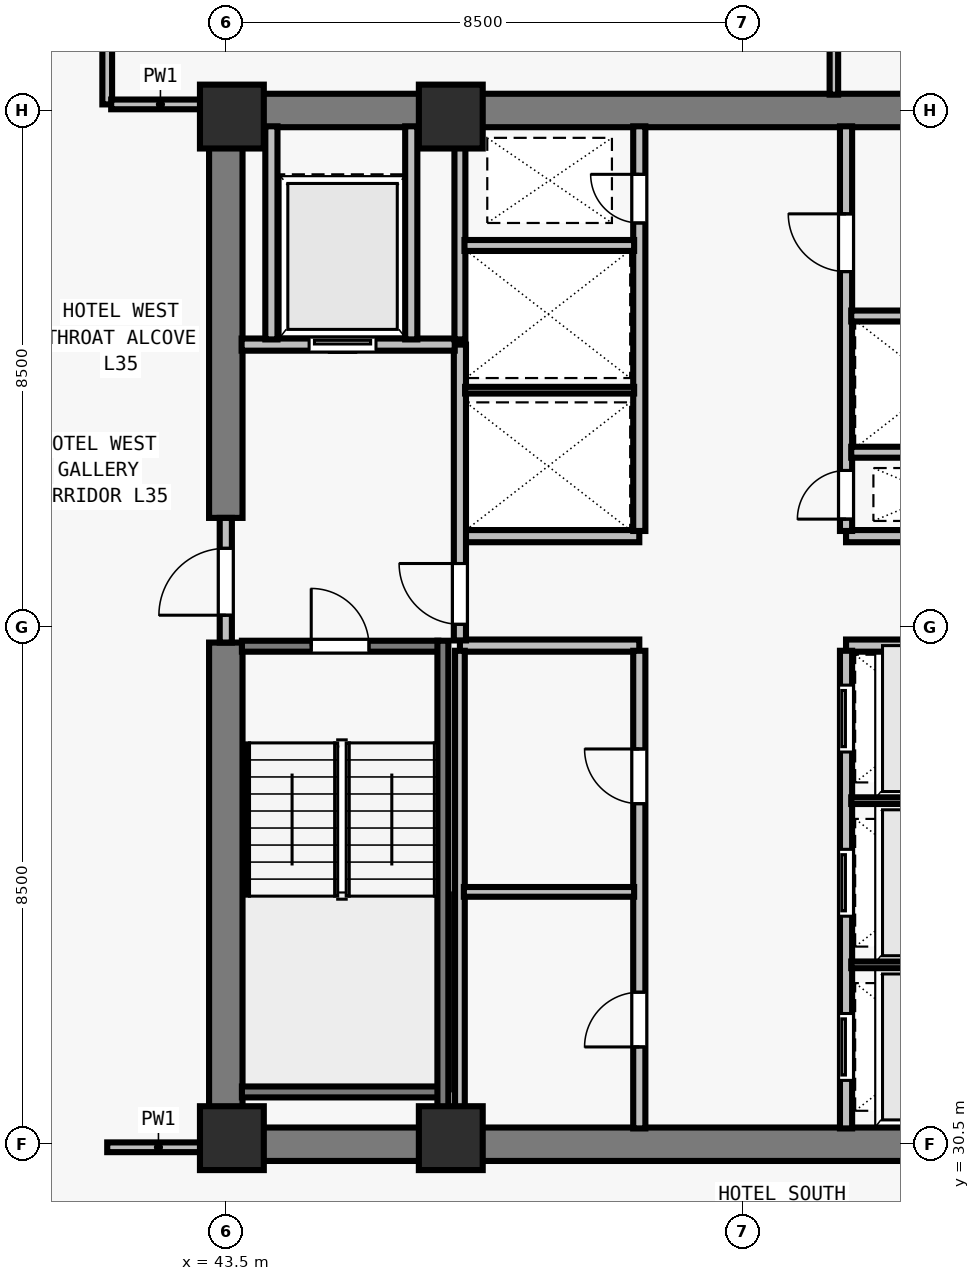
"""IFC4 building model, lengths in metres.
Left out: names, types, materials, properties, quantities, classifications, styles, units other than length and angle.
Written with IfcOpenShell. Run it as: python <this file> out.ifc"""

import sys

from ifc_helpers import new_model, si_unit, direction, frame, frame_2d, origin, origin_2d, place, context, subcontext, project, spatial, rectangle, extrude, element, fill, save


model = new_model("IFC4")
c1 = context("Model", 3, precision=1e-05, world=origin(), true_north=direction((0.0, 1.0)))
c2 = subcontext(c1, "Body", "Model", "MODEL_VIEW")
j1 = project(units=[si_unit("LENGTHUNIT", "METRE"), si_unit("PLANEANGLEUNIT", "RADIAN")], contexts=[c1])
p1 = place(None, origin())
s1 = spatial("IfcSite", under=j1, at=p1, CompositionType="ELEMENT")
p2 = place(p1, origin())
s2 = spatial("IfcBuilding", under=s1, at=p2, CompositionType="ELEMENT")
p3 = place(p2, frame((0.0, 0.0, 130.5)))
s3 = spatial("IfcBuildingStorey", under=s2, at=p3, CompositionType="ELEMENT", Elevation=130.5)
for number, where, z_axis, x_axis in (
    (1, (43.6, 30.6, 0.0), (0.0, 0.0, 1.0), (1.0, 0.0, 0.0)),
    (2, (47.2, 30.6, 0.0), (0.0, 0.0, 1.0), (1.0, 0.0, 0.0)),
    (3, (43.6, 47.4, 0.0), (0.0, 0.0, 1.0), (1.0, 0.0, 0.0)),
    (4, (47.2, 47.4, 0.0), (0.0, 0.0, 1.0), (1.0, 0.0, 0.0)),
):
    element("IfcColumn", number, at=place(p3, frame(where, z_axis=z_axis, x_axis=x_axis)), inside=s3, PredefinedType="COLUMN", context=c2, shape_type="SweptSolid", body=[
        extrude(rectangle(XDim=1.05, YDim=1.05, at=origin_2d()), origin(), (0.0, 0.0, 1.0), 3.5),
    ])
for number, where, z_axis, x_axis in (
    (5, (43.225, 30.5, 0.0), (0.0, 0.0, 1.0), (1.0, 0.0, 0.0)),
    (6, (43.225, 47.5, 0.0), (0.0, 0.0, 1.0), (1.0, 0.0, 0.0)),
):
    element("IfcWall", number, at=place(p3, frame(where, z_axis=z_axis, x_axis=x_axis)), inside=s3, PredefinedType="SHEAR", context=c2, shape_type="SweptSolid", body=[
        extrude(rectangle(XDim=17.55, YDim=0.55, at=frame_2d((8.775, 0.0))), origin(), (0.0, 0.0, 1.0), 3.28),
    ])
p4 = place(p3, frame((43.5, 30.765, 0.0), z_axis=(0.0, 0.0, 1.0), x_axis=(0.0, 1.0, 0.0)))
e7 = element("IfcWall", 7, at=p4, inside=s3, PredefinedType="SHEAR", context=c2, shape_type="SweptSolid", body=[
    extrude(rectangle(XDim=7.985, YDim=0.55, at=frame_2d((3.993, 0.0))), origin(), (0.0, 0.0, 1.0), 3.28),
])
p5 = place(p3, frame((43.5, 40.8, 0.0), z_axis=(0.0, 0.0, 1.0), x_axis=(0.0, 1.0, 0.0)))
e8 = element("IfcWall", 8, at=p5, inside=s3, PredefinedType="SHEAR", context=c2, shape_type="SweptSolid", body=[
    extrude(rectangle(XDim=6.435, YDim=0.55, at=frame_2d((3.218, 0.0))), origin(), (0.0, 0.0, 1.0), 3.28),
])
for number, where, z_axis, x_axis in (
    (9, (47.35, 38.7, 0.0), (0.0, 0.0, 1.0), (1.0, 0.0, 0.0)),
    (10, (47.35, 40.5, 0.0), (0.0, 0.0, 1.0), (1.0, 0.0, 0.0)),
    (11, (53.7, 38.7, 0.0), (0.0, 0.0, 1.0), (1.0, 0.0, 0.0)),
    (12, (53.7, 40.5, 0.0), (0.0, 0.0, 1.0), (1.0, 0.0, 0.0)),
):
    element("IfcWall", number, at=place(p3, frame(where, z_axis=z_axis, x_axis=x_axis)), inside=s3, PredefinedType="SOLIDWALL", context=c2, shape_type="SweptSolid", body=[
        extrude(rectangle(XDim=2.95, YDim=0.2, at=frame_2d((1.475, 0.0))), origin(), (0.0, 0.0, 1.0), 3.28),
    ])
p6 = place(p3, frame((50.3, 30.76, 0.0), z_axis=(0.0, 0.0, 1.0), x_axis=(0.0, 1.0, 0.0)))
e13 = element("IfcWall", 13, at=p6, inside=s3, PredefinedType="SOLIDWALL", context=c2, shape_type="SweptSolid", body=[
    extrude(rectangle(XDim=7.855, YDim=0.2, at=frame_2d((3.927, 0.0))), origin(), (0.0, 0.0, 1.0), 3.28),
])
p7 = place(p6, frame((1.34, 0.0, 0.0)))
e14 = element("IfcOpeningElement", 14, at=p7, cuts=e13, PredefinedType="OPENING", context=c2, shape_type="SweptSolid", body=[
    extrude(rectangle(XDim=0.9, YDim=2.12, at=frame_2d((0.45, 1.06))), frame((0.0, 0.11, 0.0), z_axis=(0.0, -1.0, 0.0), x_axis=(1.0, 0.0, 0.0)), (0.0, 0.0, 1.0), 0.22),
])
p8 = place(p6, frame((5.34, 0.0, 0.0)))
e15 = element("IfcOpeningElement", 15, at=p8, cuts=e13, PredefinedType="OPENING", context=c2, shape_type="SweptSolid", body=[
    extrude(rectangle(XDim=0.9, YDim=2.12, at=frame_2d((0.45, 1.06))), frame((0.0, 0.11, 0.0), z_axis=(0.0, -1.0, 0.0), x_axis=(1.0, 0.0, 0.0)), (0.0, 0.0, 1.0), 0.22),
])
p9 = place(p3, frame((53.7, 30.76, 0.0), z_axis=(0.0, 0.0, 1.0), x_axis=(0.0, 1.0, 0.0)))
e16 = element("IfcWall", 16, at=p9, inside=s3, PredefinedType="SOLIDWALL", context=c2, shape_type="SweptSolid", body=[
    extrude(rectangle(XDim=7.855, YDim=0.2, at=frame_2d((3.927, 0.0))), origin(), (0.0, 0.0, 1.0), 3.28),
])
p10 = place(p9, frame((0.79, 0.0, 0.0)))
e17 = element("IfcOpeningElement", 17, at=p10, cuts=e16, PredefinedType="OPENING", context=c2, shape_type="SweptSolid", body=[
    extrude(rectangle(XDim=1.1, YDim=2.2, at=frame_2d((0.55, 1.1))), frame((0.0, 0.11, 0.0), z_axis=(0.0, -1.0, 0.0), x_axis=(1.0, 0.0, 0.0)), (0.0, 0.0, 1.0), 0.22),
])
p11 = place(p9, frame((3.49, 0.0, 0.0)))
e18 = element("IfcOpeningElement", 18, at=p11, cuts=e16, PredefinedType="OPENING", context=c2, shape_type="SweptSolid", body=[
    extrude(rectangle(XDim=1.1, YDim=2.2, at=frame_2d((0.55, 1.1))), frame((0.0, 0.11, 0.0), z_axis=(0.0, -1.0, 0.0), x_axis=(1.0, 0.0, 0.0)), (0.0, 0.0, 1.0), 0.22),
])
p12 = place(p9, frame((6.19, 0.0, 0.0)))
e19 = element("IfcOpeningElement", 19, at=p12, cuts=e16, PredefinedType="OPENING", context=c2, shape_type="SweptSolid", body=[
    extrude(rectangle(XDim=1.1, YDim=2.2, at=frame_2d((0.55, 1.1))), frame((0.0, 0.11, 0.0), z_axis=(0.0, -1.0, 0.0), x_axis=(1.0, 0.0, 0.0)), (0.0, 0.0, 1.0), 0.22),
])
p13 = place(p3, frame((50.3, 40.585, 0.0), z_axis=(0.0, 0.0, 1.0), x_axis=(0.0, 1.0, 0.0)))
e20 = element("IfcWall", 20, at=p13, inside=s3, PredefinedType="SOLIDWALL", context=c2, shape_type="SweptSolid", body=[
    extrude(rectangle(XDim=6.655, YDim=0.2, at=frame_2d((3.328, 0.0))), origin(), (0.0, 0.0, 1.0), 3.28),
])
p14 = place(p13, frame((5.065, 0.0, 0.0)))
e21 = element("IfcOpeningElement", 21, at=p14, cuts=e20, PredefinedType="OPENING", context=c2, shape_type="SweptSolid", body=[
    extrude(rectangle(XDim=0.8, YDim=2.08, at=frame_2d((0.4, 1.04))), frame((0.0, 0.11, 0.0), z_axis=(0.0, -1.0, 0.0), x_axis=(1.0, 0.0, 0.0)), (0.0, 0.0, 1.0), 0.22),
])
p15 = place(p3, frame((53.7, 40.585, 0.0), z_axis=(0.0, 0.0, 1.0), x_axis=(0.0, 1.0, 0.0)))
e22 = element("IfcWall", 22, at=p15, inside=s3, PredefinedType="SOLIDWALL", context=c2, shape_type="SweptSolid", body=[
    extrude(rectangle(XDim=6.655, YDim=0.2, at=frame_2d((3.328, 0.0))), origin(), (0.0, 0.0, 1.0), 3.28),
])
p16 = place(p15, frame((0.195, 0.0, 0.0)))
e23 = element("IfcOpeningElement", 23, at=p16, cuts=e22, PredefinedType="OPENING", context=c2, shape_type="SweptSolid", body=[
    extrude(rectangle(XDim=0.8, YDim=2.08, at=frame_2d((0.4, 1.04))), frame((0.0, 0.11, 0.0), z_axis=(0.0, -1.0, 0.0), x_axis=(1.0, 0.0, 0.0)), (0.0, 0.0, 1.0), 0.22),
])
p17 = place(p15, frame((4.265, 0.0, 0.0)))
e24 = element("IfcOpeningElement", 24, at=p17, cuts=e22, PredefinedType="OPENING", context=c2, shape_type="SweptSolid", body=[
    extrude(rectangle(XDim=0.95, YDim=2.12, at=frame_2d((0.475, 1.06))), frame((0.0, 0.11, 0.0), z_axis=(0.0, -1.0, 0.0), x_axis=(1.0, 0.0, 0.0)), (0.0, 0.0, 1.0), 0.22),
])
p18 = place(p3, frame((43.5, 38.75, 0.0), z_axis=(0.0, 0.0, 1.0), x_axis=(0.0, 1.0, 0.0)))
e25 = element("IfcWall", 25, at=p18, inside=s3, PredefinedType="SOLIDWALL", context=c2, shape_type="SweptSolid", body=[
    extrude(rectangle(XDim=2.05, YDim=0.2, at=frame_2d((1.025, 0.0))), origin(), (0.0, 0.0, 1.0), 3.28),
])
p19 = place(p18, frame((0.45, 0.0, 0.0)))
e26 = element("IfcOpeningElement", 26, at=p19, cuts=e25, PredefinedType="OPENING", context=c2, shape_type="SweptSolid", body=[
    extrude(rectangle(XDim=1.1, YDim=2.15, at=frame_2d((0.55, 1.075))), frame((0.0, 0.11, 0.0), z_axis=(0.0, -1.0, 0.0), x_axis=(1.0, 0.0, 0.0)), (0.0, 0.0, 1.0), 0.22),
])
p20 = place(p3, frame((47.35, 38.785, 0.0), z_axis=(0.0, 0.0, 1.0), x_axis=(0.0, 1.0, 0.0)))
e27 = element("IfcWall", 27, at=p20, inside=s3, PredefinedType="SOLIDWALL", context=c2, shape_type="SweptSolid", body=[
    extrude(rectangle(XDim=4.865, YDim=0.2, at=frame_2d((2.433, 0.0))), origin(), (0.0, 0.0, 1.0), 3.28),
])
p21 = place(p20, frame((0.265, 0.0, 0.0)))
e28 = element("IfcOpeningElement", 28, at=p21, cuts=e27, PredefinedType="OPENING", context=c2, shape_type="SweptSolid", body=[
    extrude(rectangle(XDim=1.0, YDim=2.15, at=frame_2d((0.5, 1.075))), frame((0.0, 0.11, 0.0), z_axis=(0.0, -1.0, 0.0), x_axis=(1.0, 0.0, 0.0)), (0.0, 0.0, 1.0), 0.22),
])
p22 = place(p3, frame((43.76, 43.65, 0.0), z_axis=(0.0, 0.0, 1.0), x_axis=(1.0, 0.0, 0.0)))
e29 = element("IfcWall", 29, at=p22, inside=s3, PredefinedType="SOLIDWALL", context=c2, shape_type="SweptSolid", body=[
    extrude(rectangle(XDim=3.505, YDim=0.2, at=frame_2d((1.752, 0.0))), origin(), (0.0, 0.0, 1.0), 3.28),
])
p23 = place(p22, frame((1.11, 0.0, 0.0)))
e30 = element("IfcOpeningElement", 30, at=p23, cuts=e29, PredefinedType="OPENING", context=c2, shape_type="SweptSolid", body=[
    extrude(rectangle(XDim=1.1, YDim=2.2, at=frame_2d((0.55, 1.1))), frame((0.0, 0.11, 0.0), z_axis=(0.0, -1.0, 0.0), x_axis=(1.0, 0.0, 0.0)), (0.0, 0.0, 1.0), 0.22),
])
for number, where, z_axis, x_axis in (
    (31, (46.55, 43.735, 0.0), (0.0, 0.0, 1.0), (0.0, 1.0, 0.0)),
    (32, (44.25, 43.735, 0.0), (0.0, 0.0, 1.0), (0.0, 1.0, 0.0)),
):
    element("IfcWall", number, at=place(p3, frame(where, z_axis=z_axis, x_axis=x_axis)), inside=s3, PredefinedType="SOLIDWALL", context=c2, shape_type="SweptSolid", body=[
        extrude(rectangle(XDim=3.505, YDim=0.2, at=frame_2d((1.752, 0.0))), origin(), (0.0, 0.0, 1.0), 3.28),
    ])
p24 = place(p3, frame((47.35, 30.76, 0.0), z_axis=(0.0, 0.0, 1.0), x_axis=(0.0, 1.0, 0.0)))
e33 = element("IfcWall", 33, at=p24, inside=s3, PredefinedType="PARTITIONING", context=c2, shape_type="SweptSolid", body=[
    extrude(rectangle(XDim=7.855, YDim=0.16, at=frame_2d((3.927, 0.0))), origin(), (0.0, 0.0, 1.0), 3.28),
])
p25 = place(p3, frame((47.415, 34.65, 0.0), z_axis=(0.0, 0.0, 1.0), x_axis=(1.0, 0.0, 0.0)))
e34 = element("IfcWall", 34, at=p25, inside=s3, PredefinedType="PARTITIONING", context=c2, shape_type="SweptSolid", body=[
    extrude(rectangle(XDim=2.8, YDim=0.16, at=frame_2d((1.4, 0.0))), origin(), (0.0, 0.0, 1.0), 3.28),
])
for number, where, z_axis, x_axis in (
    (35, (53.785, 33.45, 0.0), (0.0, 0.0, 1.0), (1.0, 0.0, 0.0)),
    (36, (53.785, 36.15, 0.0), (0.0, 0.0, 1.0), (1.0, 0.0, 0.0)),
):
    element("IfcWall", number, at=place(p3, frame(where, z_axis=z_axis, x_axis=x_axis)), inside=s3, PredefinedType="PARTITIONING", context=c2, shape_type="SweptSolid", body=[
        extrude(rectangle(XDim=2.79, YDim=0.11, at=frame_2d((1.395, 0.0))), origin(), (0.0, 0.0, 1.0), 3.28),
    ])
p26 = place(p3, frame((47.35, 43.735, 0.0), z_axis=(0.0, 0.0, 1.0), x_axis=(0.0, 1.0, 0.0)))
e37 = element("IfcWall", 37, at=p26, inside=s3, PredefinedType="SOLIDWALL", context=c2, shape_type="SweptSolid", body=[
    extrude(rectangle(XDim=3.505, YDim=0.18, at=frame_2d((1.752, 0.0))), origin(), (0.0, 0.0, 1.0), 3.28),
])
p27 = place(p3, frame((47.435, 42.9, 0.0), z_axis=(0.0, 0.0, 1.0), x_axis=(1.0, 0.0, 0.0)))
e38 = element("IfcWall", 38, at=p27, inside=s3, PredefinedType="PARTITIONING", context=c2, shape_type="SweptSolid", body=[
    extrude(rectangle(XDim=2.78, YDim=0.11, at=frame_2d((1.39, 0.0))), origin(), (0.0, 0.0, 1.0), 3.28),
])
p28 = place(p3, frame((47.425, 45.28, 0.0), z_axis=(0.0, 0.0, 1.0), x_axis=(1.0, 0.0, 0.0)))
e39 = element("IfcWall", 39, at=p28, inside=s3, PredefinedType="SOLIDWALL", context=c2, shape_type="SweptSolid", body=[
    extrude(rectangle(XDim=2.79, YDim=0.18, at=frame_2d((1.395, 0.0))), origin(), (0.0, 0.0, 1.0), 3.28),
])
p29 = place(p3, frame((53.785, 41.88, 0.0), z_axis=(0.0, 0.0, 1.0), x_axis=(1.0, 0.0, 0.0)))
e40 = element("IfcWall", 40, at=p29, inside=s3, PredefinedType="SOLIDWALL", context=c2, shape_type="SweptSolid", body=[
    extrude(rectangle(XDim=2.78, YDim=0.18, at=frame_2d((1.39, 0.0))), origin(), (0.0, 0.0, 1.0), 3.28),
])
p30 = place(p3, frame((53.785, 44.12, 0.0), z_axis=(0.0, 0.0, 1.0), x_axis=(1.0, 0.0, 0.0)))
e41 = element("IfcWall", 41, at=p30, inside=s3, PredefinedType="SOLIDWALL", context=c2, shape_type="SweptSolid", body=[
    extrude(rectangle(XDim=2.79, YDim=0.18, at=frame_2d((1.395, 0.0))), origin(), (0.0, 0.0, 1.0), 3.28),
])
p31 = place(p3, frame((41.55, 47.6, 0.0), z_axis=(0.0, 0.0, 1.0), x_axis=(0.0, 1.0, 0.0)))
e42 = element("IfcWall", 42, at=p31, inside=s3, PredefinedType="PARTITIONING", context=c2, shape_type="SweptSolid", body=[
    extrude(rectangle(XDim=15.075, YDim=0.16, at=frame_2d((7.538, 0.0))), origin(), (0.0, 0.0, 1.0), 2.555),
])
p32 = place(p31, frame((3.5, 0.0, 0.0)))
e43 = element("IfcOpeningElement", 43, at=p32, cuts=e42, PredefinedType="OPENING", context=c2, shape_type="SweptSolid", body=[
    extrude(rectangle(XDim=0.96, YDim=2.12, at=frame_2d((0.48, 1.06))), frame((0.0, 0.09, 0.0), z_axis=(0.0, -1.0, 0.0), x_axis=(1.0, 0.0, 0.0)), (0.0, 0.0, 1.0), 0.18),
])
p33 = place(p3, frame((41.55, 30.45, 0.0), z_axis=(0.0, 0.0, 1.0), x_axis=(1.0, 0.0, 0.0)))
e44 = element("IfcWall", 44, at=p33, inside=s3, PredefinedType="PARTITIONING", context=c2, shape_type="SweptSolid", body=[
    extrude(rectangle(XDim=1.685, YDim=0.16, at=frame_2d((0.843, 0.0))), origin(), (0.0, 0.0, 1.0), 3.28),
])
p34 = place(p3, frame((41.615, 47.6, 0.0), z_axis=(0.0, 0.0, 1.0), x_axis=(1.0, 0.0, 0.0)))
e45 = element("IfcWall", 45, at=p34, inside=s3, PredefinedType="PARTITIONING", context=c2, shape_type="SweptSolid", body=[
    extrude(rectangle(XDim=1.62, YDim=0.16, at=frame_2d((0.81, 0.0))), origin(), (0.0, 0.0, 1.0), 3.28),
])
p35 = place(p3, frame((53.5, 47.76, 0.0), z_axis=(0.0, 0.0, 1.0), x_axis=(0.0, 1.0, 0.0)))
e46 = element("IfcWall", 46, at=p35, inside=s3, PredefinedType="PARTITIONING", context=c2, shape_type="SweptSolid", body=[
    extrude(rectangle(XDim=14.915, YDim=0.14, at=frame_2d((7.458, 0.0))), origin(), (0.0, 0.0, 1.0), 2.896),
])
p36 = place(p3, frame((43.765, 38.69, 0.0), z_axis=(0.0, 0.0, 1.0), x_axis=(1.0, 0.0, 0.0)))
e47 = element("IfcWall", 47, at=p36, inside=s3, PredefinedType="SOLIDWALL", context=c2, shape_type="SweptSolid", body=[
    extrude(rectangle(XDim=3.23, YDim=0.18, at=frame_2d((1.615, 0.0))), origin(), (0.0, 0.0, 1.0), 3.28),
])
p37 = place(p36, frame((1.14, 0.0, 0.0)))
e48 = element("IfcOpeningElement", 48, at=p37, cuts=e47, PredefinedType="OPENING", context=c2, shape_type="SweptSolid", body=[
    extrude(rectangle(XDim=0.95, YDim=2.15, at=frame_2d((0.475, 1.075))), frame((0.0, 0.1, 0.0), z_axis=(0.0, -1.0, 0.0), x_axis=(1.0, 0.0, 0.0)), (0.0, 0.0, 1.0), 0.2),
])
p38 = place(p3, frame((43.765, 31.36, 0.0), z_axis=(0.0, 0.0, 1.0), x_axis=(1.0, 0.0, 0.0)))
e49 = element("IfcWall", 49, at=p38, inside=s3, PredefinedType="SOLIDWALL", context=c2, shape_type="SweptSolid", body=[
    extrude(rectangle(XDim=3.23, YDim=0.18, at=frame_2d((1.615, 0.0))), origin(), (0.0, 0.0, 1.0), 3.28),
])
p39 = place(p3, frame((47.07, 38.78, 0.0), z_axis=(0.0, 0.0, 1.0), x_axis=(0.0, -1.0, 0.0)))
e50 = element("IfcWall", 50, at=p39, inside=s3, PredefinedType="SOLIDWALL", context=c2, shape_type="SweptSolid", body=[
    extrude(rectangle(XDim=8.017, YDim=0.18, at=frame_2d((4.009, 0.0))), origin(), (0.0, 0.0, 1.0), 3.28),
])
p40 = place(p19, origin())
e51 = element("IfcDoor", 51, at=p40, inside=s3, OperationType="SINGLE_SWING_LEFT", PredefinedType="DOOR", context=c2, shape_type="SweptSolid", body=[
    extrude(rectangle(XDim=1.1, YDim=2.15, at=frame_2d((0.55, 1.075))), frame((0.0, 0.025, 0.0), z_axis=(0.0, -1.0, 0.0), x_axis=(1.0, 0.0, 0.0)), (0.0, 0.0, 1.0), 0.05),
])
fill(e26, e51)
p41 = place(p21, origin())
e52 = element("IfcDoor", 52, at=p41, inside=s3, OperationType="SINGLE_SWING_RIGHT", PredefinedType="DOOR", context=c2, shape_type="SweptSolid", body=[
    extrude(rectangle(XDim=1.0, YDim=2.15, at=frame_2d((0.5, 1.075))), frame((0.0, 0.025, 0.0), z_axis=(0.0, -1.0, 0.0), x_axis=(1.0, 0.0, 0.0)), (0.0, 0.0, 1.0), 0.05),
])
fill(e28, e52)
p42 = place(p23, origin())
e53 = element("IfcDoor", 53, at=p42, inside=s3, OperationType="SLIDING_TO_LEFT", PredefinedType="DOOR", context=c2, shape_type="SweptSolid", body=[
    extrude(rectangle(XDim=1.1, YDim=2.2, at=frame_2d((0.55, 1.1))), frame((0.0, 0.025, 0.0), z_axis=(0.0, -1.0, 0.0), x_axis=(1.0, 0.0, 0.0)), (0.0, 0.0, 1.0), 0.05),
])
fill(e30, e53)
p43 = place(p7, origin())
e54 = element("IfcDoor", 54, at=p43, inside=s3, OperationType="SINGLE_SWING_LEFT", PredefinedType="DOOR", context=c2, shape_type="SweptSolid", body=[
    extrude(rectangle(XDim=0.9, YDim=2.12, at=frame_2d((0.45, 1.06))), frame((0.0, 0.025, 0.0), z_axis=(0.0, -1.0, 0.0), x_axis=(1.0, 0.0, 0.0)), (0.0, 0.0, 1.0), 0.05),
])
fill(e14, e54)
p44 = place(p8, origin())
e55 = element("IfcDoor", 55, at=p44, inside=s3, OperationType="SINGLE_SWING_RIGHT", PredefinedType="DOOR", context=c2, shape_type="SweptSolid", body=[
    extrude(rectangle(XDim=0.9, YDim=2.12, at=frame_2d((0.45, 1.06))), frame((0.0, 0.025, 0.0), z_axis=(0.0, -1.0, 0.0), x_axis=(1.0, 0.0, 0.0)), (0.0, 0.0, 1.0), 0.05),
])
fill(e15, e55)
p45 = place(p10, origin())
e56 = element("IfcDoor", 56, at=p45, inside=s3, OperationType="SLIDING_TO_LEFT", PredefinedType="DOOR", context=c2, shape_type="SweptSolid", body=[
    extrude(rectangle(XDim=1.1, YDim=2.2, at=frame_2d((0.55, 1.1))), frame((0.0, 0.025, 0.0), z_axis=(0.0, -1.0, 0.0), x_axis=(1.0, 0.0, 0.0)), (0.0, 0.0, 1.0), 0.05),
])
fill(e17, e56)
p46 = place(p11, origin())
e57 = element("IfcDoor", 57, at=p46, inside=s3, OperationType="SLIDING_TO_LEFT", PredefinedType="DOOR", context=c2, shape_type="SweptSolid", body=[
    extrude(rectangle(XDim=1.1, YDim=2.2, at=frame_2d((0.55, 1.1))), frame((0.0, 0.025, 0.0), z_axis=(0.0, -1.0, 0.0), x_axis=(1.0, 0.0, 0.0)), (0.0, 0.0, 1.0), 0.05),
])
fill(e18, e57)
p47 = place(p12, origin())
e58 = element("IfcDoor", 58, at=p47, inside=s3, OperationType="SLIDING_TO_LEFT", PredefinedType="DOOR", context=c2, shape_type="SweptSolid", body=[
    extrude(rectangle(XDim=1.1, YDim=2.2, at=frame_2d((0.55, 1.1))), frame((0.0, 0.025, 0.0), z_axis=(0.0, -1.0, 0.0), x_axis=(1.0, 0.0, 0.0)), (0.0, 0.0, 1.0), 0.05),
])
fill(e19, e58)
p48 = place(p14, origin())
e59 = element("IfcDoor", 59, at=p48, inside=s3, OperationType="SINGLE_SWING_RIGHT", PredefinedType="DOOR", context=c2, shape_type="SweptSolid", body=[
    extrude(rectangle(XDim=0.8, YDim=2.08, at=frame_2d((0.4, 1.04))), frame((0.0, 0.025, 0.0), z_axis=(0.0, -1.0, 0.0), x_axis=(1.0, 0.0, 0.0)), (0.0, 0.0, 1.0), 0.05),
])
fill(e21, e59)
p49 = place(p16, origin())
e60 = element("IfcDoor", 60, at=p49, inside=s3, OperationType="SINGLE_SWING_LEFT", PredefinedType="DOOR", context=c2, shape_type="SweptSolid", body=[
    extrude(rectangle(XDim=0.8, YDim=2.08, at=frame_2d((0.4, 1.04))), frame((0.0, 0.025, 0.0), z_axis=(0.0, -1.0, 0.0), x_axis=(1.0, 0.0, 0.0)), (0.0, 0.0, 1.0), 0.05),
])
fill(e23, e60)
p50 = place(p17, origin())
e61 = element("IfcDoor", 61, at=p50, inside=s3, OperationType="SINGLE_SWING_RIGHT", PredefinedType="DOOR", context=c2, shape_type="SweptSolid", body=[
    extrude(rectangle(XDim=0.95, YDim=2.12, at=frame_2d((0.475, 1.06))), frame((0.0, 0.025, 0.0), z_axis=(0.0, -1.0, 0.0), x_axis=(1.0, 0.0, 0.0)), (0.0, 0.0, 1.0), 0.05),
])
fill(e24, e61)
p51 = place(p37, origin())
e62 = element("IfcDoor", 62, at=p51, inside=s3, OperationType="SINGLE_SWING_LEFT", PredefinedType="DOOR", context=c2, shape_type="SweptSolid", body=[
    extrude(rectangle(XDim=0.95, YDim=2.15, at=frame_2d((0.475, 1.075))), frame((0.0, 0.025, 0.0), z_axis=(0.0, -1.0, 0.0), x_axis=(1.0, 0.0, 0.0)), (0.0, 0.0, 1.0), 0.05),
])
fill(e48, e62)
save(model, sys.argv[1])
